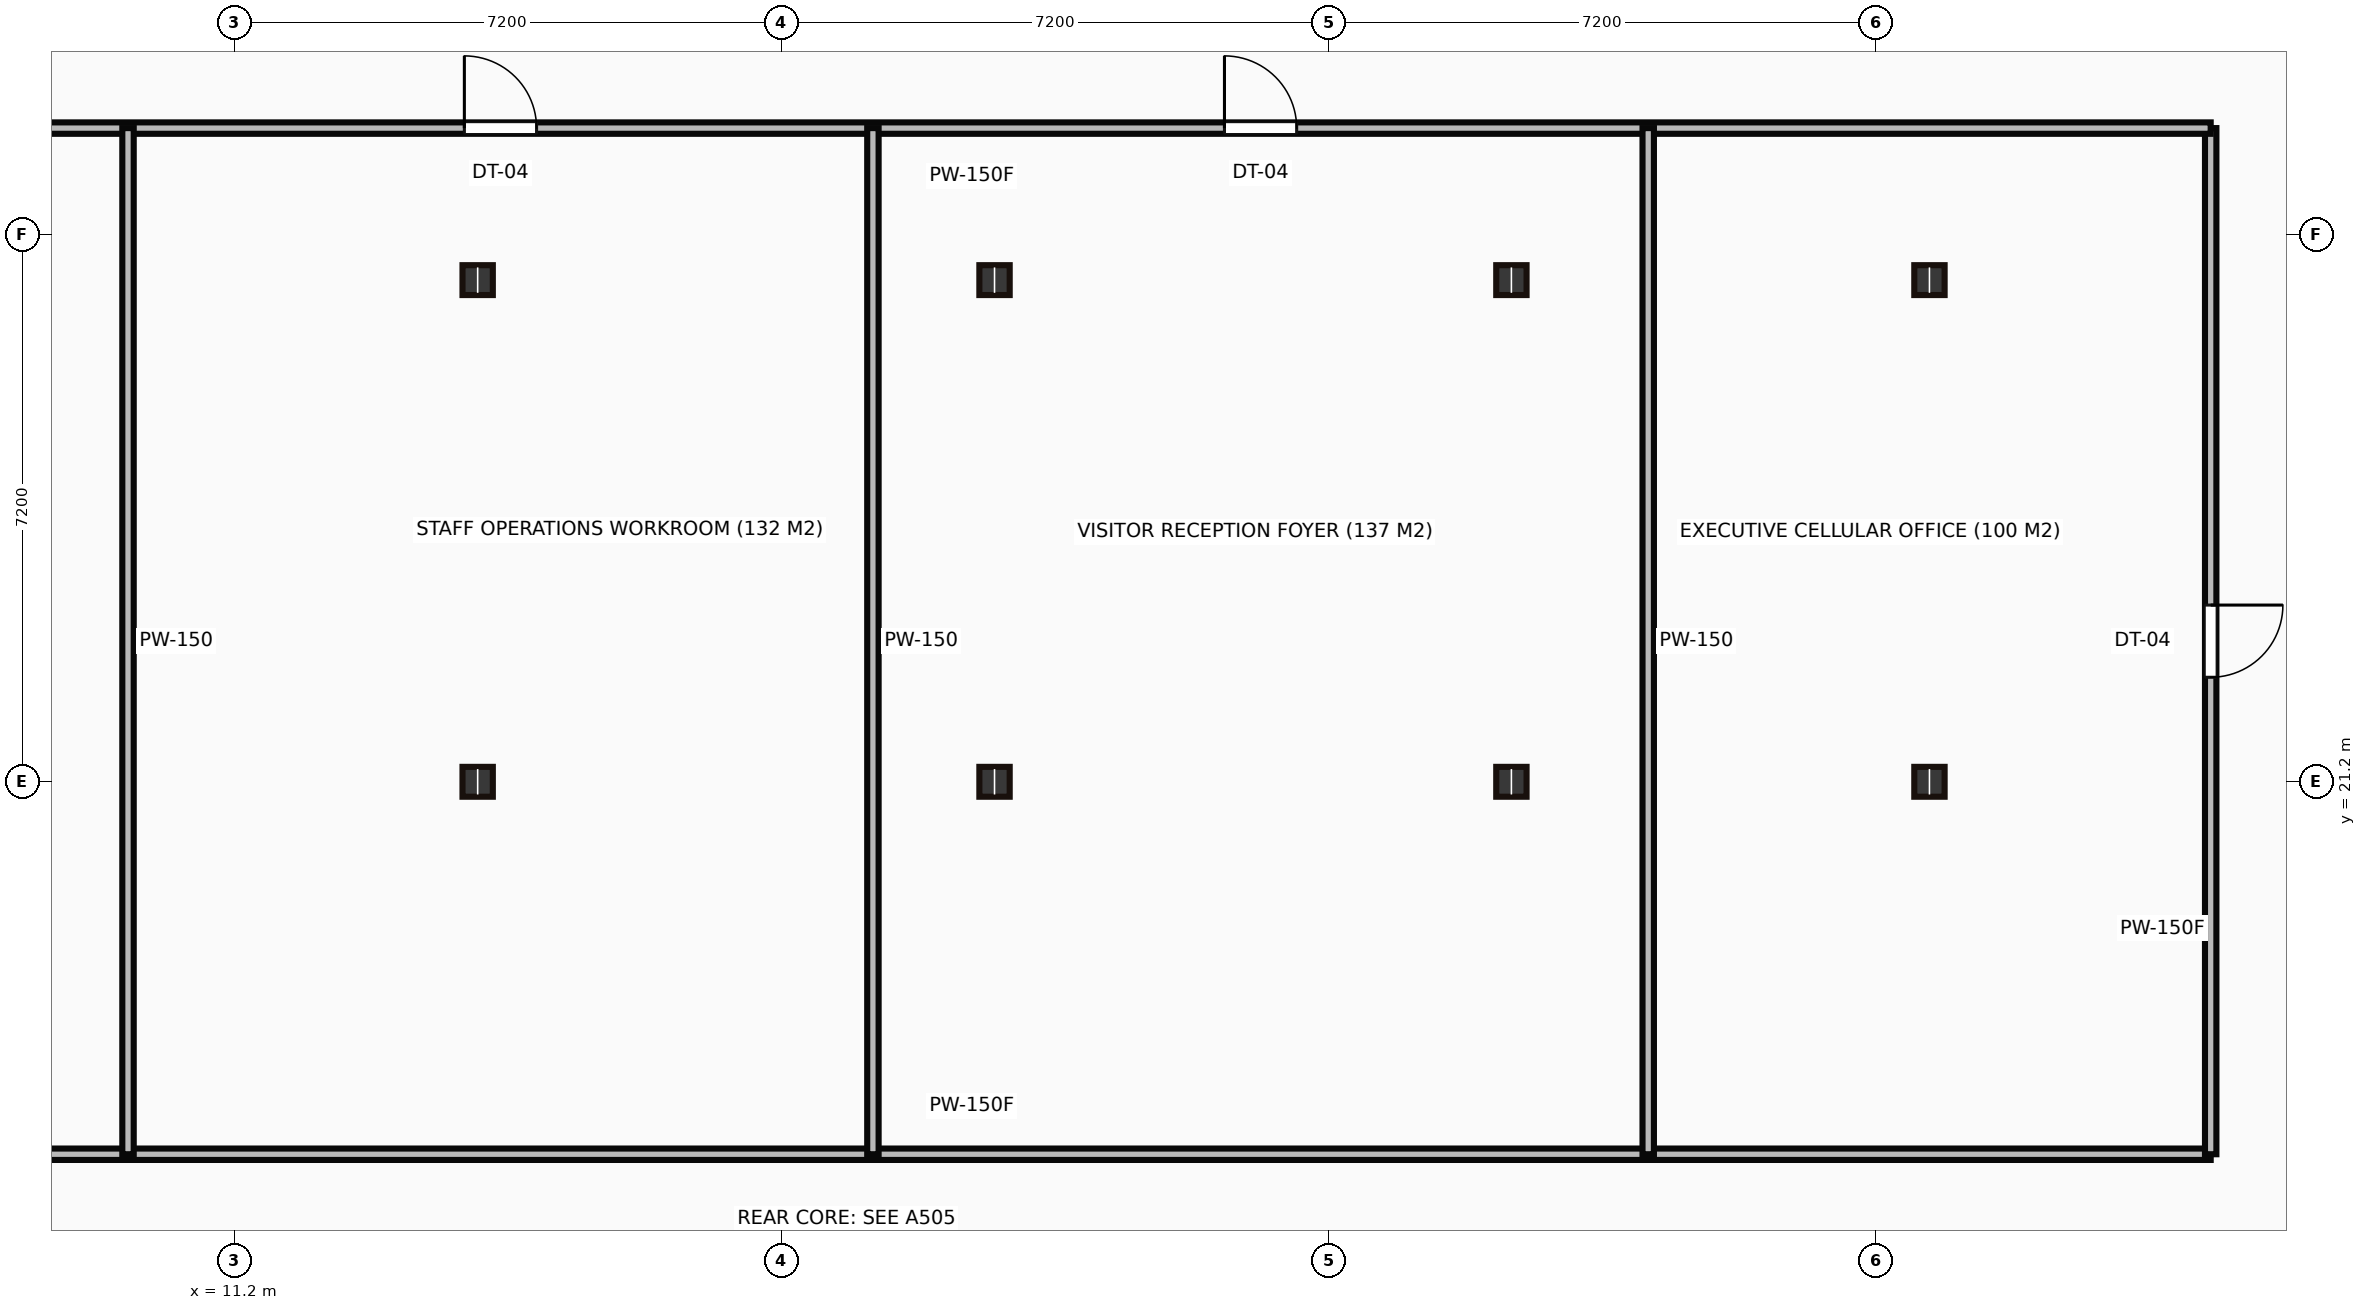
"""IFC4 building model, lengths in metres.
Left out: names, types, materials, properties, quantities, classifications, styles, units other than length and angle.
Written with IfcOpenShell. Run it as: python <this file> out.ifc"""

import sys

from ifc_helpers import new_model, si_unit, direction, frame, frame_2d, origin, origin_2d, place, context, subcontext, project, spatial, rectangle, i_section, extrude, source, transform, mapped, element, fill, save


model = new_model("IFC4")
c1 = context("Model", 3, precision=1e-05, world=origin(), true_north=direction((0.0, 1.0)))
c2 = subcontext(c1, "Body", "Model", "MODEL_VIEW")
j1 = project(units=[si_unit("LENGTHUNIT", "METRE"), si_unit("PLANEANGLEUNIT", "RADIAN")], contexts=[c1])
p1 = place(None, origin())
s1 = spatial("IfcSite", under=j1, at=p1, CompositionType="ELEMENT")
p2 = place(p1, origin())
s2 = spatial("IfcBuilding", under=s1, at=p2, CompositionType="ELEMENT")
p3 = place(p2, frame((0.0, 0.0, 121.5)))
s3 = spatial("IfcBuildingStorey", under=s2, at=p3, CompositionType="ELEMENT", Elevation=121.5)
m1 = source(origin(), c2, "Body", "SweptSolid", [
    extrude(i_section(OverallWidth=0.399, OverallDepth=0.393, WebThickness=0.023, FlangeThickness=0.037, at=origin_2d()), origin(), (0.0, 0.0, 1.0), 3.65),
])
for number, where, z_axis, x_axis in (
    (1, (14.4, 21.2, 0.0), (0.0, 0.0, 1.0), (1.0, 0.0, 0.0)),
    (2, (14.4, 27.8, 0.0), (0.0, 0.0, 1.0), (1.0, 0.0, 0.0)),
    (3, (21.2, 21.2, 0.0), (0.0, 0.0, 1.0), (1.0, 0.0, 0.0)),
    (4, (21.2, 27.8, 0.0), (0.0, 0.0, 1.0), (1.0, 0.0, 0.0)),
    (5, (28.0, 21.2, 0.0), (0.0, 0.0, 1.0), (1.0, 0.0, 0.0)),
    (6, (28.0, 27.8, 0.0), (0.0, 0.0, 1.0), (1.0, 0.0, 0.0)),
    (7, (33.5, 21.2, 0.0), (0.0, 0.0, 1.0), (1.0, 0.0, 0.0)),
    (8, (33.5, 27.8, 0.0), (0.0, 0.0, 1.0), (1.0, 0.0, 0.0)),
):
    element("IfcColumn", number, at=place(p3, frame(where, z_axis=z_axis, x_axis=x_axis)), inside=s3, PredefinedType="COLUMN", context=c2, shape_type="MappedRepresentation", body=[
        mapped(m1, transform((0.0, 0.0, 0.0))),
    ])
m2 = source(origin(), c2, "Body", "SweptSolid", [
    extrude(rectangle(XDim=32.6, YDim=0.15, at=frame_2d((16.3, 0.0))), origin(), (0.0, 0.0, 1.0), 3.4),
])
p4 = place(p3, frame((4.6, 16.3, 0.0), z_axis=(0.0, 0.0, 1.0), x_axis=(1.0, 0.0, 0.0)))
e9 = element("IfcWall", 9, at=p4, inside=s3, PredefinedType="PARTITIONING", context=c2, shape_type="MappedRepresentation", body=[
    mapped(m2, transform((0.0, 0.0, 0.0))),
])
p5 = place(p4, frame((2.255, 0.0, 0.0)))
e10 = element("IfcOpeningElement", 10, at=p5, cuts=e9, PredefinedType="OPENING", context=c2, shape_type="SweptSolid", body=[
    extrude(rectangle(XDim=0.95, YDim=2.15, at=frame_2d((0.475, 1.075))), frame((0.0, 0.085, 0.0), z_axis=(0.0, -1.0, 0.0), x_axis=(1.0, 0.0, 0.0)), (0.0, 0.0, 1.0), 0.17),
])
m3 = source(origin(), c2, "Body", "SweptSolid", [
    extrude(rectangle(XDim=13.5, YDim=0.15, at=frame_2d((6.75, 0.0))), origin(), (0.0, 0.0, 1.0), 3.4),
])
p6 = place(p3, frame((37.2, 16.3, 0.0), z_axis=(0.0, 0.0, 1.0), x_axis=(0.0, 1.0, 0.0)))
e11 = element("IfcWall", 11, at=p6, inside=s3, PredefinedType="PARTITIONING", context=c2, shape_type="MappedRepresentation", body=[
    mapped(m3, transform((0.0, 0.0, 0.0))),
])
p7 = place(p6, frame((6.275, 0.0, 0.0)))
e12 = element("IfcOpeningElement", 12, at=p7, cuts=e11, PredefinedType="OPENING", context=c2, shape_type="SweptSolid", body=[
    extrude(rectangle(XDim=0.95, YDim=2.15, at=frame_2d((0.475, 1.075))), frame((0.0, 0.085, 0.0), z_axis=(0.0, -1.0, 0.0), x_axis=(1.0, 0.0, 0.0)), (0.0, 0.0, 1.0), 0.17),
])
p8 = place(p3, frame((37.2, 29.8, 0.0), z_axis=(0.0, 0.0, 1.0), x_axis=(-1.0, 0.0, 0.0)))
e13 = element("IfcWall", 13, at=p8, inside=s3, PredefinedType="PARTITIONING", context=c2, shape_type="MappedRepresentation", body=[
    mapped(m2, transform((0.0, 0.0, 0.0))),
])
p9 = place(p8, frame((22.025, 0.0, 0.0)))
e14 = element("IfcOpeningElement", 14, at=p9, cuts=e13, PredefinedType="OPENING", context=c2, shape_type="SweptSolid", body=[
    extrude(rectangle(XDim=0.95, YDim=2.15, at=frame_2d((0.475, 1.075))), frame((0.0, 0.085, 0.0), z_axis=(0.0, -1.0, 0.0), x_axis=(1.0, 0.0, 0.0)), (0.0, 0.0, 1.0), 0.17),
])
p10 = place(p8, frame((12.025, 0.0, 0.0)))
e15 = element("IfcOpeningElement", 15, at=p10, cuts=e13, PredefinedType="OPENING", context=c2, shape_type="SweptSolid", body=[
    extrude(rectangle(XDim=0.95, YDim=2.15, at=frame_2d((0.475, 1.075))), frame((0.0, 0.085, 0.0), z_axis=(0.0, -1.0, 0.0), x_axis=(1.0, 0.0, 0.0)), (0.0, 0.0, 1.0), 0.17),
])
for number, where, z_axis, x_axis in (
    (16, (9.8, 29.8, 0.0), (0.0, 0.0, 1.0), (0.0, -1.0, 0.0)),
    (17, (19.6, 29.8, 0.0), (0.0, 0.0, 1.0), (0.0, -1.0, 0.0)),
    (18, (29.8, 29.8, 0.0), (0.0, 0.0, 1.0), (0.0, -1.0, 0.0)),
):
    element("IfcWall", number, at=place(p3, frame(where, z_axis=z_axis, x_axis=x_axis)), inside=s3, PredefinedType="PARTITIONING", context=c2, shape_type="MappedRepresentation", body=[
        mapped(m3, transform((0.0, 0.0, 0.0))),
    ])
m4 = source(origin(), c2, "Body", "SweptSolid", [
    extrude(rectangle(XDim=0.95, YDim=2.15, at=frame_2d((0.475, 1.075))), frame((0.0, 0.025, 0.0), z_axis=(0.0, -1.0, 0.0), x_axis=(1.0, 0.0, 0.0)), (0.0, 0.0, 1.0), 0.05),
])
p11 = place(p9, origin())
e19 = element("IfcDoor", 19, at=p11, inside=s3, OperationType="SINGLE_SWING_RIGHT", PredefinedType="DOOR", context=c2, shape_type="MappedRepresentation", body=[
    mapped(m4, transform((0.0, 0.0, 0.0))),
])
fill(e14, e19)
p12 = place(p10, origin())
e20 = element("IfcDoor", 20, at=p12, inside=s3, OperationType="SINGLE_SWING_RIGHT", PredefinedType="DOOR", context=c2, shape_type="MappedRepresentation", body=[
    mapped(m4, transform((0.0, 0.0, 0.0))),
])
fill(e15, e20)
p13 = place(p7, origin())
e21 = element("IfcDoor", 21, at=p13, inside=s3, OperationType="SINGLE_SWING_RIGHT", PredefinedType="DOOR", context=c2, shape_type="MappedRepresentation", body=[
    mapped(m4, transform((0.0, 0.0, 0.0))),
])
fill(e12, e21)
save(model, sys.argv[1])
